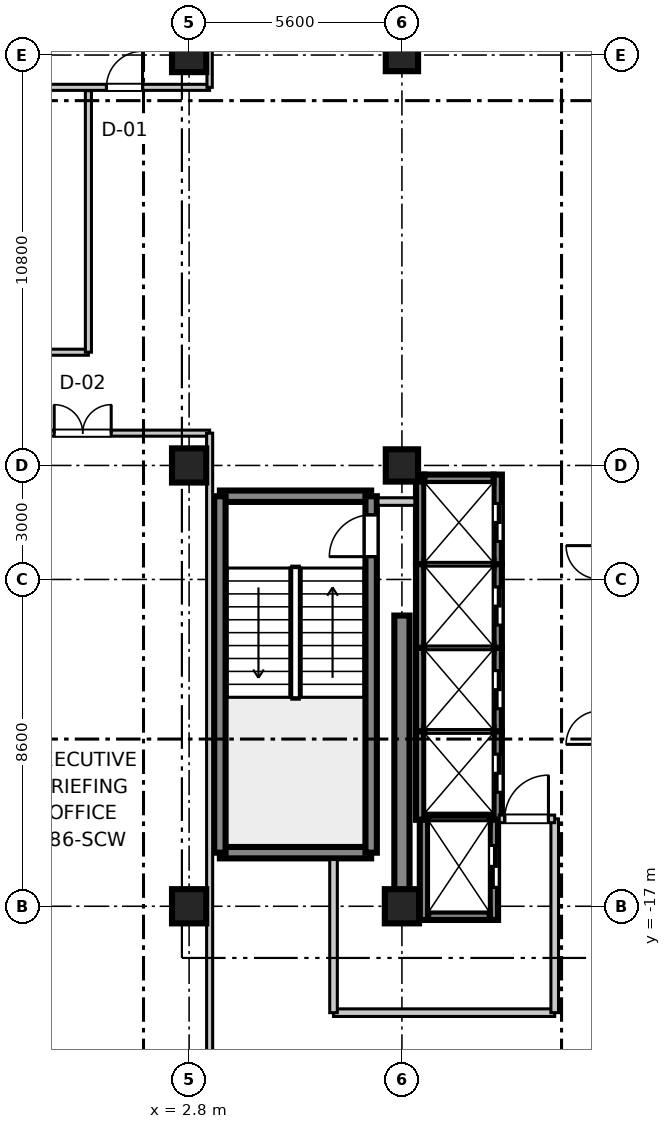
"""IFC4 building model, lengths in metres.
Left out: names, types, materials, properties, quantities, classifications, styles, units other than length and angle.
Written with IfcOpenShell. Run it as: python <this file> out.ifc"""

import sys

from ifc_helpers import new_model, si_unit, direction, frame, frame_2d, origin, origin_2d, place, context, subcontext, project, spatial, rectangle, extrude, source, transform, mapped, element, fill, save


model = new_model("IFC4")
c1 = context("Model", 3, precision=1e-05, world=origin(), true_north=direction((0.0, 1.0)))
c2 = subcontext(c1, "Body", "Model", "MODEL_VIEW")
j1 = project(units=[si_unit("LENGTHUNIT", "METRE"), si_unit("PLANEANGLEUNIT", "RADIAN")], contexts=[c1])
p1 = place(None, origin())
s1 = spatial("IfcSite", under=j1, at=p1, CompositionType="ELEMENT")
p2 = place(p1, origin())
s2 = spatial("IfcBuilding", under=s1, at=p2, CompositionType="ELEMENT")
p3 = place(p2, frame((0.0, 0.0, 334.75)))
s3 = spatial("IfcBuildingStorey", under=s2, at=p3, CompositionType="ELEMENT", Elevation=334.75)
m1 = source(origin(), c2, "Body", "SweptSolid", [
    extrude(rectangle(XDim=0.9, YDim=0.9, at=origin_2d()), origin(), (0.0, 0.0, 1.0), 3.755),
])
for number, where, z_axis, x_axis in (
    (1, (2.8, -17.0, 0.0), (0.0, 0.0, 1.0), (1.0, 0.0, 0.0)),
    (2, (2.8, -5.4, 0.0), (0.0, 0.0, 1.0), (1.0, 0.0, 0.0)),
    (3, (2.8, 5.4, 0.0), (0.0, 0.0, 1.0), (1.0, 0.0, 0.0)),
    (4, (8.4, -17.0, 0.0), (0.0, 0.0, 1.0), (1.0, 0.0, 0.0)),
):
    element("IfcColumn", number, at=place(p3, frame(where, z_axis=z_axis, x_axis=x_axis)), inside=s3, PredefinedType="COLUMN", context=c2, shape_type="MappedRepresentation", body=[
        mapped(m1, transform((0.0, 0.0, 0.0), scale=1.0)),
    ])
m2 = source(origin(), c2, "Body", "SweptSolid", [
    extrude(rectangle(XDim=0.85, YDim=0.85, at=origin_2d()), origin(), (0.0, 0.0, 1.0), 3.755),
])
for number, where, z_axis, x_axis in (
    (5, (8.4, -5.4, 0.0), (0.0, 0.0, 1.0), (1.0, 0.0, 0.0)),
    (6, (8.4, 5.4, 0.0), (0.0, 0.0, 1.0), (1.0, 0.0, 0.0)),
):
    element("IfcColumn", number, at=place(p3, frame(where, z_axis=z_axis, x_axis=x_axis)), inside=s3, PredefinedType="PILASTER", context=c2, shape_type="MappedRepresentation", body=[
        mapped(m2, transform((0.0, 0.0, 0.0), scale=1.0)),
    ])
m3 = source(origin(), c2, "Body", "SweptSolid", [
    extrude(rectangle(XDim=7.65, YDim=0.4, at=frame_2d((3.825, 0.0))), origin(), (0.0, 0.0, 1.0), 3.47),
])
p4 = place(p3, frame((8.4, -17.0, 0.0), z_axis=(0.0, 0.0, 1.0), x_axis=(0.0, 1.0, 0.0)))
e7 = element("IfcWall", 7, at=p4, inside=s3, PredefinedType="SHEAR", context=c2, shape_type="MappedRepresentation", body=[
    mapped(m3, transform((0.0, 0.0, 0.0), scale=1.0)),
])
m4 = source(origin(), c2, "Body", "SweptSolid", [
    extrude(rectangle(XDim=3.98, YDim=0.3, at=frame_2d((1.99, 0.0))), origin(), (0.0, 0.0, 1.0), 3.47),
])
for number, where, z_axis, x_axis in (
    (8, (3.61, -15.59, 0.0), (0.0, 0.0, 1.0), (1.0, 0.0, 0.0)),
    (9, (3.61, -6.21, 0.0), (0.0, 0.0, 1.0), (1.0, 0.0, 0.0)),
):
    element("IfcWall", number, at=place(p3, frame(where, z_axis=z_axis, x_axis=x_axis)), inside=s3, PredefinedType="SHEAR", context=c2, shape_type="MappedRepresentation", body=[
        mapped(m4, transform((0.0, 0.0, 0.0), scale=1.0)),
    ])
m5 = source(origin(), c2, "Body", "SweptSolid", [
    extrude(rectangle(XDim=9.38, YDim=0.3, at=frame_2d((4.69, 0.0))), origin(), (0.0, 0.0, 1.0), 3.47),
])
p5 = place(p3, frame((3.61, -15.59, 0.0), z_axis=(0.0, 0.0, 1.0), x_axis=(0.0, 1.0, 0.0)))
e10 = element("IfcWall", 10, at=p5, inside=s3, PredefinedType="SHEAR", context=c2, shape_type="MappedRepresentation", body=[
    mapped(m5, transform((0.0, 0.0, 0.0), scale=1.0)),
])
p6 = place(p3, frame((7.59, -15.59, 0.0), z_axis=(0.0, 0.0, 1.0), x_axis=(0.0, 1.0, 0.0)))
e11 = element("IfcWall", 11, at=p6, inside=s3, PredefinedType="SHEAR", context=c2, shape_type="MappedRepresentation", body=[
    mapped(m5, transform((0.0, 0.0, 0.0), scale=1.0)),
])
p7 = place(p6, frame((7.79, 0.0, 0.0)))
e12 = element("IfcOpeningElement", 12, at=p7, cuts=e11, PredefinedType="OPENING", context=c2, shape_type="SweptSolid", body=[
    extrude(rectangle(XDim=1.1, YDim=2.15, at=frame_2d((0.55, 1.075))), frame((0.0, 0.16, 0.0), z_axis=(0.0, -1.0, 0.0), x_axis=(1.0, 0.0, 0.0)), (0.0, 0.0, 1.0), 0.32),
])
m6 = source(origin(), c2, "Body", "SweptSolid", [
    extrude(rectangle(XDim=2.36, YDim=0.22, at=frame_2d((1.18, 0.0))), origin(), (0.0, 0.0, 1.0), 3.47),
])
p8 = place(p3, frame((8.88, -8.0, 0.0), z_axis=(0.0, 0.0, 1.0), x_axis=(0.0, 1.0, 0.0)))
e13 = element("IfcWall", 13, at=p8, inside=s3, PredefinedType="SHEAR", context=c2, shape_type="MappedRepresentation", body=[
    mapped(m6, transform((0.0, 0.0, 0.0), scale=1.0)),
])
p9 = place(p3, frame((10.92, -8.0, 0.0), z_axis=(0.0, 0.0, 1.0), x_axis=(0.0, 1.0, 0.0)))
e14 = element("IfcWall", 14, at=p9, inside=s3, PredefinedType="SHEAR", context=c2, shape_type="MappedRepresentation", body=[
    mapped(m6, transform((0.0, 0.0, 0.0), scale=1.0)),
])
p10 = place(p9, frame((0.6, 0.0, 0.0)))
e15 = element("IfcOpeningElement", 15, at=p10, cuts=e14, PredefinedType="OPENING", context=c2, shape_type="SweptSolid", body=[
    extrude(rectangle(XDim=1.0, YDim=2.2, at=frame_2d((0.5, 1.1))), frame((0.0, 0.12, 0.0), z_axis=(0.0, -1.0, 0.0), x_axis=(1.0, 0.0, 0.0)), (0.0, 0.0, 1.0), 0.24),
])
m7 = source(origin(), c2, "Body", "SweptSolid", [
    extrude(rectangle(XDim=1.82, YDim=0.22, at=frame_2d((0.91, 0.0))), origin(), (0.0, 0.0, 1.0), 3.47),
])
p11 = place(p3, frame((8.99, -5.75, 0.0), z_axis=(0.0, 0.0, 1.0), x_axis=(1.0, 0.0, 0.0)))
e16 = element("IfcWall", 16, at=p11, inside=s3, PredefinedType="SHEAR", context=c2, shape_type="MappedRepresentation", body=[
    mapped(m7, transform((0.0, 0.0, 0.0), scale=1.0)),
])
m8 = source(origin(), c2, "Body", "SweptSolid", [
    extrude(rectangle(XDim=2.2, YDim=0.22, at=frame_2d((1.1, 0.0))), origin(), (0.0, 0.0, 1.0), 3.47),
])
p12 = place(p3, frame((8.88, -10.2, 0.0), z_axis=(0.0, 0.0, 1.0), x_axis=(0.0, 1.0, 0.0)))
e17 = element("IfcWall", 17, at=p12, inside=s3, PredefinedType="SHEAR", context=c2, shape_type="MappedRepresentation", body=[
    mapped(m8, transform((0.0, 0.0, 0.0), scale=1.0)),
])
p13 = place(p3, frame((10.92, -10.2, 0.0), z_axis=(0.0, 0.0, 1.0), x_axis=(0.0, 1.0, 0.0)))
e18 = element("IfcWall", 18, at=p13, inside=s3, PredefinedType="SHEAR", context=c2, shape_type="MappedRepresentation", body=[
    mapped(m8, transform((0.0, 0.0, 0.0), scale=1.0)),
])
p14 = place(p13, frame((0.6, 0.0, 0.0)))
e19 = element("IfcOpeningElement", 19, at=p14, cuts=e18, PredefinedType="OPENING", context=c2, shape_type="SweptSolid", body=[
    extrude(rectangle(XDim=1.0, YDim=2.2, at=frame_2d((0.5, 1.1))), frame((0.0, 0.12, 0.0), z_axis=(0.0, -1.0, 0.0), x_axis=(1.0, 0.0, 0.0)), (0.0, 0.0, 1.0), 0.24),
])
m9 = source(origin(), c2, "Body", "SweptSolid", [
    extrude(rectangle(XDim=1.82, YDim=0.22, at=frame_2d((0.91, 0.0))), origin(), (0.0, 0.0, 1.0), 3.8),
])
p15 = place(p3, frame((8.99, -8.0, 0.0), z_axis=(0.0, 0.0, 1.0), x_axis=(1.0, 0.0, 0.0)))
e20 = element("IfcWall", 20, at=p15, inside=s3, PredefinedType="SHEAR", context=c2, shape_type="MappedRepresentation", body=[
    mapped(m9, transform((0.0, 0.0, 0.0), scale=1.0)),
])
p16 = place(p3, frame((8.88, -12.4, 0.0), z_axis=(0.0, 0.0, 1.0), x_axis=(0.0, 1.0, 0.0)))
e21 = element("IfcWall", 21, at=p16, inside=s3, PredefinedType="SHEAR", context=c2, shape_type="MappedRepresentation", body=[
    mapped(m8, transform((0.0, 0.0, 0.0), scale=1.0)),
])
p17 = place(p3, frame((10.92, -12.4, 0.0), z_axis=(0.0, 0.0, 1.0), x_axis=(0.0, 1.0, 0.0)))
e22 = element("IfcWall", 22, at=p17, inside=s3, PredefinedType="SHEAR", context=c2, shape_type="MappedRepresentation", body=[
    mapped(m8, transform((0.0, 0.0, 0.0), scale=1.0)),
])
p18 = place(p17, frame((0.6, 0.0, 0.0)))
e23 = element("IfcOpeningElement", 23, at=p18, cuts=e22, PredefinedType="OPENING", context=c2, shape_type="SweptSolid", body=[
    extrude(rectangle(XDim=1.0, YDim=2.2, at=frame_2d((0.5, 1.1))), frame((0.0, 0.12, 0.0), z_axis=(0.0, -1.0, 0.0), x_axis=(1.0, 0.0, 0.0)), (0.0, 0.0, 1.0), 0.24),
])
p19 = place(p3, frame((8.99, -10.2, 0.0), z_axis=(0.0, 0.0, 1.0), x_axis=(1.0, 0.0, 0.0)))
e24 = element("IfcWall", 24, at=p19, inside=s3, PredefinedType="SHEAR", context=c2, shape_type="MappedRepresentation", body=[
    mapped(m9, transform((0.0, 0.0, 0.0), scale=1.0)),
])
m10 = source(origin(), c2, "Body", "SweptSolid", [
    extrude(rectangle(XDim=2.325, YDim=0.22, at=frame_2d((1.163, 0.0))), origin(), (0.0, 0.0, 1.0), 3.47),
])
p20 = place(p3, frame((8.88, -14.725, 0.0), z_axis=(0.0, 0.0, 1.0), x_axis=(0.0, 1.0, 0.0)))
e25 = element("IfcWall", 25, at=p20, inside=s3, PredefinedType="SHEAR", context=c2, shape_type="MappedRepresentation", body=[
    mapped(m10, transform((0.0, 0.0, 0.0), scale=1.0)),
])
p21 = place(p3, frame((10.92, -14.725, 0.0), z_axis=(0.0, 0.0, 1.0), x_axis=(0.0, 1.0, 0.0)))
e26 = element("IfcWall", 26, at=p21, inside=s3, PredefinedType="SHEAR", context=c2, shape_type="MappedRepresentation", body=[
    mapped(m10, transform((0.0, 0.0, 0.0), scale=1.0)),
])
p22 = place(p21, frame((0.725, 0.0, 0.0)))
e27 = element("IfcOpeningElement", 27, at=p22, cuts=e26, PredefinedType="OPENING", context=c2, shape_type="SweptSolid", body=[
    extrude(rectangle(XDim=1.0, YDim=2.2, at=frame_2d((0.5, 1.1))), frame((0.0, 0.12, 0.0), z_axis=(0.0, -1.0, 0.0), x_axis=(1.0, 0.0, 0.0)), (0.0, 0.0, 1.0), 0.24),
])
p23 = place(p3, frame((8.99, -12.4, 0.0), z_axis=(0.0, 0.0, 1.0), x_axis=(1.0, 0.0, 0.0)))
e28 = element("IfcWall", 28, at=p23, inside=s3, PredefinedType="SHEAR", context=c2, shape_type="MappedRepresentation", body=[
    mapped(m9, transform((0.0, 0.0, 0.0), scale=1.0)),
])
m11 = source(origin(), c2, "Body", "SweptSolid", [
    extrude(rectangle(XDim=2.635, YDim=0.22, at=frame_2d((1.317, 0.0))), origin(), (0.0, 0.0, 1.0), 3.47),
])
p24 = place(p3, frame((8.98, -17.36, 0.0), z_axis=(0.0, 0.0, 1.0), x_axis=(0.0, 1.0, 0.0)))
e29 = element("IfcWall", 29, at=p24, inside=s3, PredefinedType="SHEAR", context=c2, shape_type="MappedRepresentation", body=[
    mapped(m11, transform((0.0, 0.0, 0.0), scale=1.0)),
])
p25 = place(p3, frame((10.82, -17.36, 0.0), z_axis=(0.0, 0.0, 1.0), x_axis=(0.0, 1.0, 0.0)))
e30 = element("IfcWall", 30, at=p25, inside=s3, PredefinedType="SHEAR", context=c2, shape_type="MappedRepresentation", body=[
    mapped(m11, transform((0.0, 0.0, 0.0), scale=1.0)),
])
p26 = place(p25, frame((0.86, 0.0, 0.0)))
e31 = element("IfcOpeningElement", 31, at=p26, cuts=e30, PredefinedType="OPENING", context=c2, shape_type="SweptSolid", body=[
    extrude(rectangle(XDim=1.1, YDim=2.2, at=frame_2d((0.55, 1.1))), frame((0.0, 0.12, 0.0), z_axis=(0.0, -1.0, 0.0), x_axis=(1.0, 0.0, 0.0)), (0.0, 0.0, 1.0), 0.24),
])
m12 = source(origin(), c2, "Body", "SweptSolid", [
    extrude(rectangle(XDim=1.62, YDim=0.22, at=frame_2d((0.81, 0.0))), origin(), (0.0, 0.0, 1.0), 3.47),
])
p27 = place(p3, frame((9.09, -17.25, 0.0), z_axis=(0.0, 0.0, 1.0), x_axis=(1.0, 0.0, 0.0)))
e32 = element("IfcWall", 32, at=p27, inside=s3, PredefinedType="SHEAR", context=c2, shape_type="MappedRepresentation", body=[
    mapped(m12, transform((0.0, 0.0, 0.0), scale=1.0)),
])
m13 = source(origin(), c2, "Body", "SweptSolid", [
    extrude(rectangle(XDim=1.62, YDim=0.22, at=frame_2d((0.81, 0.0))), origin(), (0.0, 0.0, 1.0), 3.8),
])
p28 = place(p3, frame((9.09, -14.725, 0.0), z_axis=(0.0, 0.0, 1.0), x_axis=(1.0, 0.0, 0.0)))
e33 = element("IfcWall", 33, at=p28, inside=s3, PredefinedType="SHEAR", context=c2, shape_type="MappedRepresentation", body=[
    mapped(m13, transform((0.0, 0.0, 0.0), scale=1.0)),
])
m14 = source(origin(), c2, "Body", "SweptSolid", [
    extrude(rectangle(XDim=5.82, YDim=0.2, at=frame_2d((2.91, 0.0))), origin(), (0.0, 0.0, 1.0), 2.81),
])
p29 = place(p3, frame((6.6, -19.8, 0.0), z_axis=(0.0, 0.0, 1.0), x_axis=(1.0, 0.0, 0.0)))
e34 = element("IfcWall", 34, at=p29, inside=s3, PredefinedType="PARTITIONING", context=c2, shape_type="MappedRepresentation", body=[
    mapped(m14, transform((0.0, 0.0, 0.0), scale=1.0)),
])
m15 = source(origin(), c2, "Body", "SweptSolid", [
    extrude(rectangle(XDim=4.03, YDim=0.2, at=frame_2d((2.015, 0.0))), origin(), (0.0, 0.0, 1.0), 2.81),
])
p30 = place(p3, frame((6.6, -19.8, 0.0), z_axis=(0.0, 0.0, 1.0), x_axis=(0.0, 1.0, 0.0)))
e35 = element("IfcWall", 35, at=p30, inside=s3, PredefinedType="PARTITIONING", context=c2, shape_type="MappedRepresentation", body=[
    mapped(m15, transform((0.0, 0.0, 0.0), scale=1.0)),
])
m16 = source(origin(), c2, "Body", "SweptSolid", [
    extrude(rectangle(XDim=5.1, YDim=0.2, at=frame_2d((2.55, 0.0))), origin(), (0.0, 0.0, 1.0), 2.81),
])
p31 = place(p3, frame((12.42, -19.8, 0.0), z_axis=(0.0, 0.0, 1.0), x_axis=(0.0, 1.0, 0.0)))
e36 = element("IfcWall", 36, at=p31, inside=s3, PredefinedType="PARTITIONING", context=c2, shape_type="MappedRepresentation", body=[
    mapped(m16, transform((0.0, 0.0, 0.0), scale=1.0)),
])
m17 = source(origin(), c2, "Body", "SweptSolid", [
    extrude(rectangle(XDim=1.46, YDim=0.2, at=frame_2d((0.73, 0.0))), origin(), (0.0, 0.0, 1.0), 2.81),
])
p32 = place(p3, frame((10.96, -14.7, 0.0), z_axis=(0.0, 0.0, 1.0), x_axis=(1.0, 0.0, 0.0)))
e37 = element("IfcWall", 37, at=p32, inside=s3, PredefinedType="PARTITIONING", context=c2, shape_type="MappedRepresentation", body=[
    mapped(m17, transform((0.0, 0.0, 0.0), scale=1.0)),
])
p33 = place(p32, frame((0.145, 0.0, 0.0)))
e38 = element("IfcOpeningElement", 38, at=p33, cuts=e37, PredefinedType="OPENING", context=c2, shape_type="SweptSolid", body=[
    extrude(rectangle(XDim=1.15, YDim=2.15, at=frame_2d((0.575, 1.075))), frame((0.0, 0.11, 0.0), z_axis=(0.0, -1.0, 0.0), x_axis=(1.0, 0.0, 0.0)), (0.0, 0.0, 1.0), 0.22),
])
m18 = source(origin(), c2, "Body", "SweptSolid", [
    extrude(rectangle(XDim=0.97, YDim=0.2, at=frame_2d((0.485, 0.0))), origin(), (0.0, 0.0, 1.0), 2.81),
])
p34 = place(p3, frame((7.77, -6.35, 0.0), z_axis=(0.0, 0.0, 1.0), x_axis=(1.0, 0.0, 0.0)))
e39 = element("IfcWall", 39, at=p34, inside=s3, PredefinedType="PARTITIONING", context=c2, shape_type="MappedRepresentation", body=[
    mapped(m18, transform((0.0, 0.0, 0.0), scale=1.0)),
])
m19 = source(origin(), c2, "Body", "SweptSolid", [
    extrude(rectangle(XDim=23.1, YDim=0.16, at=frame_2d((11.55, 0.0))), origin(), (0.0, 0.0, 1.0), 2.81),
])
p35 = place(p3, frame((-19.76, 4.55, 0.0), z_axis=(0.0, 0.0, 1.0), x_axis=(1.0, 0.0, 0.0)))
e40 = element("IfcWall", 40, at=p35, inside=s3, PredefinedType="PARTITIONING", context=c2, shape_type="MappedRepresentation", body=[
    mapped(m19, transform((0.0, 0.0, 0.0), scale=1.0)),
])
p36 = place(p35, frame((20.385, 0.0, 0.0)))
e41 = element("IfcOpeningElement", 41, at=p36, cuts=e40, PredefinedType="OPENING", context=c2, shape_type="SweptSolid", body=[
    extrude(rectangle(XDim=0.95, YDim=2.1, at=frame_2d((0.475, 1.05))), frame((0.0, 0.09, 0.0), z_axis=(0.0, -1.0, 0.0), x_axis=(1.0, 0.0, 0.0)), (0.0, 0.0, 1.0), 0.18),
])
m20 = source(origin(), c2, "Body", "SweptSolid", [
    extrude(rectangle(XDim=17.95, YDim=0.14, at=frame_2d((8.975, 0.0))), origin(), (0.0, 0.0, 1.0), 2.81),
])
p37 = place(p3, frame((3.34, 4.55, 0.0), z_axis=(0.0, 0.0, 1.0), x_axis=(0.0, 1.0, 0.0)))
e42 = element("IfcWall", 42, at=p37, inside=s3, PredefinedType="PARTITIONING", context=c2, shape_type="MappedRepresentation", body=[
    mapped(m20, transform((0.0, 0.0, 0.0), scale=1.0)),
])
m21 = source(origin(), c2, "Body", "SweptSolid", [
    extrude(rectangle(XDim=6.68, YDim=0.16, at=frame_2d((3.34, 0.0))), origin(), (0.0, 0.0, 1.0), 2.81),
])
p38 = place(p3, frame((-3.34, -4.55, 0.0), z_axis=(0.0, 0.0, 1.0), x_axis=(1.0, 0.0, 0.0)))
e43 = element("IfcWall", 43, at=p38, inside=s3, PredefinedType="PARTITIONING", context=c2, shape_type="MappedRepresentation", body=[
    mapped(m21, transform((0.0, 0.0, 0.0), scale=1.0)),
])
p39 = place(p38, frame((2.59, 0.0, 0.0)))
e44 = element("IfcOpeningElement", 44, at=p39, cuts=e43, PredefinedType="OPENING", context=c2, shape_type="SweptSolid", body=[
    extrude(rectangle(XDim=1.5, YDim=2.15, at=frame_2d((0.75, 1.075))), frame((0.0, 0.09, 0.0), z_axis=(0.0, -1.0, 0.0), x_axis=(1.0, 0.0, 0.0)), (0.0, 0.0, 1.0), 0.18),
])
m22 = source(origin(), c2, "Body", "SweptSolid", [
    extrude(rectangle(XDim=17.95, YDim=0.16, at=frame_2d((8.975, 0.0))), origin(), (0.0, 0.0, 1.0), 2.81),
])
p40 = place(p3, frame((3.34, -22.5, 0.0), z_axis=(0.0, 0.0, 1.0), x_axis=(0.0, 1.0, 0.0)))
e45 = element("IfcWall", 45, at=p40, inside=s3, PredefinedType="PARTITIONING", context=c2, shape_type="MappedRepresentation", body=[
    mapped(m22, transform((0.0, 0.0, 0.0), scale=1.0)),
])
m23 = source(origin(), c2, "Body", "SweptSolid", [
    extrude(rectangle(XDim=22.65, YDim=0.16, at=frame_2d((11.325, 0.0))), origin(), (0.0, 0.0, 1.0), 2.81),
])
p41 = place(p3, frame((-22.5, -2.42, 0.0), z_axis=(0.0, 0.0, 1.0), x_axis=(1.0, 0.0, 0.0)))
e46 = element("IfcWall", 46, at=p41, inside=s3, PredefinedType="PARTITIONING", context=c2, shape_type="MappedRepresentation", body=[
    mapped(m23, transform((0.0, 0.0, 0.0), scale=1.0)),
])
p42 = place(p41, frame((8.758, 0.0, 0.0)))
e47 = element("IfcOpeningElement", 47, at=p42, cuts=e46, PredefinedType="OPENING", context=c2, shape_type="SweptSolid", body=[
    extrude(rectangle(XDim=1.5, YDim=2.15, at=frame_2d((0.75, 1.075))), frame((0.0, 0.09, 0.0), z_axis=(0.0, -1.0, 0.0), x_axis=(1.0, 0.0, 0.0)), (0.0, 0.0, 1.0), 0.18),
])
m24 = source(origin(), c2, "Body", "SweptSolid", [
    extrude(rectangle(XDim=6.88, YDim=0.16, at=frame_2d((3.44, 0.0))), origin(), (0.0, 0.0, 1.0), 2.81),
])
p43 = place(p3, frame((0.15, -2.42, 0.0), z_axis=(0.0, 0.0, 1.0), x_axis=(0.0, 1.0, 0.0)))
e48 = element("IfcWall", 48, at=p43, inside=s3, PredefinedType="PARTITIONING", context=c2, shape_type="MappedRepresentation", body=[
    mapped(m24, transform((0.0, 0.0, 0.0), scale=1.0)),
])
m25 = source(origin(), c2, "Body", "SweptSolid", [
    extrude(rectangle(XDim=1.1, YDim=2.15, at=frame_2d((0.55, 1.075))), frame((0.0, 0.025, 0.0), z_axis=(0.0, -1.0, 0.0), x_axis=(1.0, 0.0, 0.0)), (0.0, 0.0, 1.0), 0.05),
])
p44 = place(p7, origin())
e49 = element("IfcDoor", 49, at=p44, inside=s3, OperationType="SINGLE_SWING_LEFT", PredefinedType="DOOR", context=c2, shape_type="MappedRepresentation", body=[
    mapped(m25, transform((0.0, 0.0, 0.0), scale=1.0)),
])
fill(e12, e49)
m26 = source(origin(), c2, "Body", "SweptSolid", [
    extrude(rectangle(XDim=1.0, YDim=2.2, at=frame_2d((0.5, 1.1))), frame((0.0, 0.025, 0.0), z_axis=(0.0, -1.0, 0.0), x_axis=(1.0, 0.0, 0.0)), (0.0, 0.0, 1.0), 0.05),
])
p45 = place(p10, frame((1.0, 0.0, 0.0), z_axis=(0.0, 0.0, 1.0), x_axis=(-1.0, 0.0, 0.0)))
e50 = element("IfcDoor", 50, at=p45, inside=s3, OperationType="DOUBLE_DOOR_SLIDING", PredefinedType="DOOR", context=c2, shape_type="MappedRepresentation", body=[
    mapped(m26, transform((0.0, 0.0, 0.0), scale=1.0)),
])
fill(e15, e50)
p46 = place(p14, frame((1.0, 0.0, 0.0), z_axis=(0.0, 0.0, 1.0), x_axis=(-1.0, 0.0, 0.0)))
e51 = element("IfcDoor", 51, at=p46, inside=s3, OperationType="DOUBLE_DOOR_SLIDING", PredefinedType="DOOR", context=c2, shape_type="MappedRepresentation", body=[
    mapped(m26, transform((0.0, 0.0, 0.0), scale=1.0)),
])
fill(e19, e51)
p47 = place(p18, frame((1.0, 0.0, 0.0), z_axis=(0.0, 0.0, 1.0), x_axis=(-1.0, 0.0, 0.0)))
e52 = element("IfcDoor", 52, at=p47, inside=s3, OperationType="DOUBLE_DOOR_SLIDING", PredefinedType="DOOR", context=c2, shape_type="MappedRepresentation", body=[
    mapped(m26, transform((0.0, 0.0, 0.0), scale=1.0)),
])
fill(e23, e52)
p48 = place(p22, frame((1.0, 0.0, 0.0), z_axis=(0.0, 0.0, 1.0), x_axis=(-1.0, 0.0, 0.0)))
e53 = element("IfcDoor", 53, at=p48, inside=s3, OperationType="DOUBLE_DOOR_SLIDING", PredefinedType="DOOR", context=c2, shape_type="MappedRepresentation", body=[
    mapped(m26, transform((0.0, 0.0, 0.0), scale=1.0)),
])
fill(e27, e53)
m27 = source(origin(), c2, "Body", "SweptSolid", [
    extrude(rectangle(XDim=1.1, YDim=2.2, at=frame_2d((0.55, 1.1))), frame((0.0, 0.025, 0.0), z_axis=(0.0, -1.0, 0.0), x_axis=(1.0, 0.0, 0.0)), (0.0, 0.0, 1.0), 0.05),
])
p49 = place(p26, frame((1.1, 0.0, 0.0), z_axis=(0.0, 0.0, 1.0), x_axis=(-1.0, 0.0, 0.0)))
e54 = element("IfcDoor", 54, at=p49, inside=s3, OperationType="DOUBLE_DOOR_SLIDING", PredefinedType="DOOR", context=c2, shape_type="MappedRepresentation", body=[
    mapped(m27, transform((0.0, 0.0, 0.0), scale=1.0)),
])
fill(e31, e54)
m28 = source(origin(), c2, "Body", "SweptSolid", [
    extrude(rectangle(XDim=1.15, YDim=2.15, at=frame_2d((0.575, 1.075))), frame((0.0, 0.025, 0.0), z_axis=(0.0, -1.0, 0.0), x_axis=(1.0, 0.0, 0.0)), (0.0, 0.0, 1.0), 0.05),
])
p50 = place(p33, origin())
e55 = element("IfcDoor", 55, at=p50, inside=s3, OperationType="SINGLE_SWING_RIGHT", PredefinedType="DOOR", context=c2, shape_type="MappedRepresentation", body=[
    mapped(m28, transform((0.0, 0.0, 0.0), scale=1.0)),
])
fill(e38, e55)
m29 = source(origin(), c2, "Body", "SweptSolid", [
    extrude(rectangle(XDim=0.95, YDim=2.1, at=frame_2d((0.475, 1.05))), frame((0.0, 0.025, 0.0), z_axis=(0.0, -1.0, 0.0), x_axis=(1.0, 0.0, 0.0)), (0.0, 0.0, 1.0), 0.05),
])
p51 = place(p36, origin())
e56 = element("IfcDoor", 56, at=p51, inside=s3, OperationType="SINGLE_SWING_RIGHT", PredefinedType="DOOR", context=c2, shape_type="MappedRepresentation", body=[
    mapped(m29, transform((0.0, 0.0, 0.0), scale=1.0)),
])
fill(e41, e56)
m30 = source(origin(), c2, "Body", "SweptSolid", [
    extrude(rectangle(XDim=1.5, YDim=2.15, at=frame_2d((0.75, 1.075))), frame((0.0, 0.025, 0.0), z_axis=(0.0, -1.0, 0.0), x_axis=(1.0, 0.0, 0.0)), (0.0, 0.0, 1.0), 0.05),
])
p52 = place(p39, frame((1.5, 0.0, 0.0), z_axis=(0.0, 0.0, 1.0), x_axis=(-1.0, 0.0, 0.0)))
e57 = element("IfcDoor", 57, at=p52, inside=s3, OperationType="DOUBLE_DOOR_SINGLE_SWING", PredefinedType="DOOR", context=c2, shape_type="MappedRepresentation", body=[
    mapped(m30, transform((0.0, 0.0, 0.0), scale=1.0)),
])
fill(e44, e57)
save(model, sys.argv[1])
